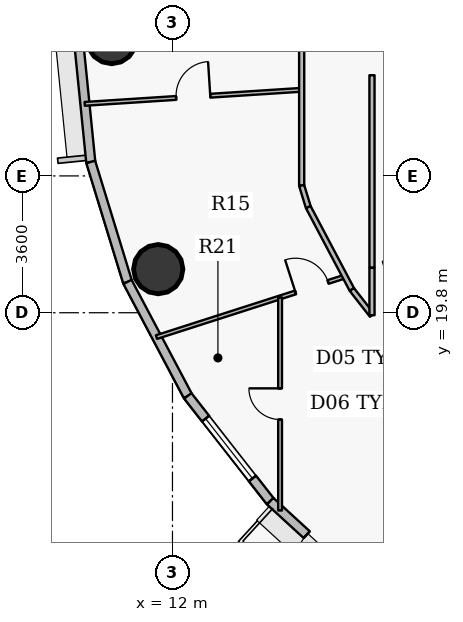
"""IFC4 building model, lengths in metres.
Left out: names, types, materials, properties, quantities, classifications, styles, units other than length and angle.
Written with IfcOpenShell. Run it as: python <this file> out.ifc"""

import sys

from ifc_helpers import new_model, si_unit, direction, frame, frame_2d, origin, origin_2d, place, context, subcontext, project, spatial, rectangle, hollow_circle, extrude, source, transform, mapped, element, fill, save


model = new_model("IFC4")
c1 = context("Model", 3, precision=1e-05, world=origin(), true_north=direction((0.0, 1.0)))
c2 = subcontext(c1, "Body", "Model", "MODEL_VIEW")
j1 = project(units=[si_unit("LENGTHUNIT", "METRE"), si_unit("PLANEANGLEUNIT", "RADIAN")], contexts=[c1])
p1 = place(None, origin())
s1 = spatial("IfcSite", under=j1, at=p1, CompositionType="ELEMENT")
p2 = place(p1, origin())
s2 = spatial("IfcBuilding", under=s1, at=p2, CompositionType="ELEMENT")
p3 = place(p2, frame((0.0, 0.0, 167.4)))
s3 = spatial("IfcBuildingStorey", under=s2, at=p3, CompositionType="ELEMENT", Elevation=167.4)
for number, where, z_axis, x_axis in (
    (1, (10.4, 27.0, 0.0), (0.0, 0.0, 1.0), (1.0, 0.0, 0.0)),
    (2, (11.625, 20.947, 0.0), (0.0, 0.0, 1.0), (1.0, 0.0, 0.0)),
):
    element("IfcColumn", number, at=place(p3, frame(where, z_axis=z_axis, x_axis=x_axis)), inside=s3, PredefinedType="COLUMN", context=c2, shape_type="SweptSolid", body=[
        extrude(hollow_circle(Radius=0.65, WallThickness=0.04, at=origin_2d()), origin(), (0.0, 0.0, 1.0), 3.75),
    ])
p4 = place(p3, frame((9.85, 23.766, 0.0), z_axis=(0.0, 0.0, 1.0), x_axis=(-0.100061534614, 0.994981250723, 0.0)))
e3 = element("IfcWall", 3, at=p4, inside=s3, PredefinedType="SOLIDWALL", context=c2, shape_type="SweptSolid", body=[
    extrude(rectangle(XDim=3.25, YDim=0.24, at=frame_2d((1.625, 0.0))), origin(), (0.0, 0.0, 1.0), 3.5),
])
p5 = place(p3, frame((10.817, 20.611, 0.0), z_axis=(0.0, 0.0, 1.0), x_axis=(-0.293097995113, 0.956082405058, 0.0)))
e4 = element("IfcWall", 4, at=p5, inside=s3, PredefinedType="SOLIDWALL", context=c2, shape_type="SweptSolid", body=[
    extrude(rectangle(XDim=3.3, YDim=0.24, at=frame_2d((1.65, 0.0))), origin(), (0.0, 0.0, 1.0), 3.5),
])
p6 = place(p3, frame((12.404, 17.612, 0.0), z_axis=(0.0, 0.0, 1.0), x_axis=(-0.467586874938, 0.88394712194, 0.0)))
e5 = element("IfcWall", 5, at=p6, inside=s3, PredefinedType="SOLIDWALL", context=c2, shape_type="SweptSolid", body=[
    extrude(rectangle(XDim=3.393, YDim=0.24, at=frame_2d((1.697, 0.0))), origin(), (0.0, 0.0, 1.0), 3.5),
])
p7 = place(p3, frame((14.572, 14.842, 0.0), z_axis=(0.0, 0.0, 1.0), x_axis=(-0.616287674549, 0.787521112224, 0.0)))
e6 = element("IfcWall", 6, at=p7, inside=s3, PredefinedType="SOLIDWALL", context=c2, shape_type="SweptSolid", body=[
    extrude(rectangle(XDim=3.517, YDim=0.24, at=frame_2d((1.759, 0.0))), origin(), (0.0, 0.0, 1.0), 3.5),
])
p8 = place(p7, frame((0.759, 0.0, 0.9)))
e7 = element("IfcOpeningElement", 7, at=p8, cuts=e6, PredefinedType="OPENING", context=c2, shape_type="SweptSolid", body=[
    extrude(rectangle(XDim=2.0, YDim=1.75, at=origin_2d()), frame((1.0, 0.13, 0.875), z_axis=(0.0, -1.0, 0.0), x_axis=(1.0, 0.0, 0.0)), (0.0, 0.0, 1.0), 0.26),
])
p9 = place(p3, frame((17.268, 12.369, 0.0), z_axis=(0.0, 0.0, 1.0), x_axis=(-0.737076565834, 0.675809245349, 0.0)))
e8 = element("IfcWall", 8, at=p9, inside=s3, PredefinedType="SOLIDWALL", context=c2, shape_type="SweptSolid", body=[
    extrude(rectangle(XDim=3.658, YDim=0.24, at=frame_2d((1.829, 0.0))), origin(), (0.0, 0.0, 1.0), 3.5),
])
p10 = place(p9, frame((1.304, 0.0, 0.0)))
e9 = element("IfcOpeningElement", 9, at=p10, cuts=e8, PredefinedType="OPENING", context=c2, shape_type="SweptSolid", body=[
    extrude(rectangle(XDim=1.05, YDim=2.15, at=origin_2d()), frame((0.525, 0.13, 1.075), z_axis=(0.0, -1.0, 0.0), x_axis=(1.0, 0.0, 0.0)), (0.0, 0.0, 1.0), 0.26),
])
p11 = place(p3, frame((9.691, 25.296, 0.0), z_axis=(0.0, 0.0, 1.0), x_axis=(0.99791042292, 0.064612598054, 0.0)))
e10 = element("IfcWall", 10, at=p11, inside=s3, PredefinedType="PARTITIONING", context=c2, shape_type="SweptSolid", body=[
    extrude(rectangle(XDim=5.721, YDim=0.1, at=frame_2d((2.86, 0.0))), origin(), (0.0, 0.0, 1.0), 2.935),
])
p12 = place(p11, frame((2.41, 0.0, 0.0)))
e11 = element("IfcOpeningElement", 11, at=p12, cuts=e10, PredefinedType="OPENING", context=c2, shape_type="SweptSolid", body=[
    extrude(rectangle(XDim=0.9, YDim=2.1, at=origin_2d()), frame((0.45, 0.06, 1.05), z_axis=(0.0, -1.0, 0.0), x_axis=(1.0, 0.0, 0.0)), (0.0, 0.0, 1.0), 0.12),
])
p13 = place(p3, frame((11.58, 19.159, 0.0), z_axis=(0.0, 0.0, 1.0), x_axis=(0.952134795804, 0.305678475885, 0.0)))
e12 = element("IfcWall", 12, at=p13, inside=s3, PredefinedType="PARTITIONING", context=c2, shape_type="SweptSolid", body=[
    extrude(rectangle(XDim=5.21, YDim=0.1, at=frame_2d((2.605, 0.0))), origin(), (0.0, 0.0, 1.0), 2.935),
])
p14 = place(p13, frame((3.843, 0.0, 0.0)))
e13 = element("IfcOpeningElement", 13, at=p14, cuts=e12, PredefinedType="OPENING", context=c2, shape_type="SweptSolid", body=[
    extrude(rectangle(XDim=0.9, YDim=2.1, at=origin_2d()), frame((0.45, 0.06, 1.05), z_axis=(0.0, -1.0, 0.0), x_axis=(1.0, 0.0, 0.0)), (0.0, 0.0, 1.0), 0.12),
])
p15 = place(p3, frame((14.832, 14.596, 0.0), z_axis=(0.0, 0.0, 1.0), x_axis=(0.0, 1.0, 0.0)))
e14 = element("IfcWall", 14, at=p15, inside=s3, PredefinedType="PARTITIONING", context=c2, shape_type="SweptSolid", body=[
    extrude(rectangle(XDim=5.607, YDim=0.1, at=frame_2d((2.804, 0.0))), origin(), (0.0, 0.0, 1.0), 2.935),
])
p16 = place(p15, frame((2.394, 0.0, 0.0)))
e15 = element("IfcOpeningElement", 15, at=p16, cuts=e14, PredefinedType="OPENING", context=c2, shape_type="SweptSolid", body=[
    extrude(rectangle(XDim=0.82, YDim=2.1, at=origin_2d()), frame((0.41, 0.06, 1.05), z_axis=(0.0, -1.0, 0.0), x_axis=(1.0, 0.0, 0.0)), (0.0, 0.0, 1.0), 0.12),
])
p17 = place(p3, frame((15.4, 23.146, 0.0), z_axis=(0.0, 0.0, 1.0), x_axis=(0.0, 1.0, 0.0)))
e16 = element("IfcWall", 16, at=p17, inside=s3, PredefinedType="PARTITIONING", context=c2, shape_type="SweptSolid", body=[
    extrude(rectangle(XDim=4.804, YDim=0.135, at=frame_2d((2.402, 0.0))), origin(), (0.0, 0.0, 1.0), 2.935),
])
p18 = place(p3, frame((15.4, 23.146, 0.0), z_axis=(0.0, 0.0, 1.0), x_axis=(0.293335154151, -0.956009669061, 0.0)))
e17 = element("IfcWall", 17, at=p18, inside=s3, PredefinedType="PARTITIONING", context=c2, shape_type="SweptSolid", body=[
    extrude(rectangle(XDim=0.594, YDim=0.135, at=frame_2d((0.297, 0.0))), origin(), (0.0, 0.0, 1.0), 3.5),
])
p19 = place(p3, frame((15.574, 22.578, 0.0), z_axis=(0.0, 0.0, 1.0), x_axis=(0.467608615334, -0.883935621448, 0.0)))
e18 = element("IfcWall", 18, at=p19, inside=s3, PredefinedType="PARTITIONING", context=c2, shape_type="SweptSolid", body=[
    extrude(rectangle(XDim=2.452, YDim=0.135, at=frame_2d((1.226, 0.0))), origin(), (0.0, 0.0, 1.0), 2.935),
])
p20 = place(p3, frame((16.72, 20.411, 0.0), z_axis=(0.0, 0.0, 1.0), x_axis=(0.616377221056, -0.787451027914, 0.0)))
e19 = element("IfcWall", 19, at=p20, inside=s3, PredefinedType="PARTITIONING", context=c2, shape_type="SweptSolid", body=[
    extrude(rectangle(XDim=0.859, YDim=0.135, at=frame_2d((0.43, 0.0))), origin(), (0.0, 0.0, 1.0), 3.5),
])
p21 = place(p3, frame((17.25, 19.734, 0.0), z_axis=(0.0, 0.0, 1.0), x_axis=(0.0, 1.0, 0.0)))
e20 = element("IfcWall", 20, at=p21, inside=s3, PredefinedType="PARTITIONING", context=c2, shape_type="SweptSolid", body=[
    extrude(rectangle(XDim=1.246, YDim=0.135, at=frame_2d((0.623, 0.0))), origin(), (0.0, 0.0, 1.0), 3.5),
])
p22 = place(p3, frame((17.25, 26.05, 0.0), z_axis=(0.0, 0.0, 1.0), x_axis=(0.0, -1.0, 0.0)))
e21 = element("IfcWall", 21, at=p22, inside=s3, PredefinedType="PARTITIONING", context=c2, shape_type="SweptSolid", body=[
    extrude(rectangle(XDim=5.06, YDim=0.135, at=frame_2d((2.53, 0.0))), origin(), (0.0, 0.0, 1.0), 2.935),
])
p23 = place(p3, frame((17.558, 21.079, 0.0), z_axis=(0.0, 0.0, 1.0), x_axis=(0.952123939642, 0.305712288861, 0.0)))
e22 = element("IfcWall", 22, at=p23, inside=s3, PredefinedType="PARTITIONING", context=c2, shape_type="SweptSolid", body=[
    extrude(rectangle(XDim=1.438, YDim=0.135, at=frame_2d((0.719, 0.0))), origin(), (0.0, 0.0, 1.0), 3.5),
])
m1 = source(origin(), c2, "Body", "SweptSolid", [
    extrude(rectangle(XDim=2.0, YDim=1.75, at=origin_2d()), frame((1.0, 0.03, 0.875), z_axis=(0.0, -1.0, 0.0), x_axis=(1.0, 0.0, 0.0)), (0.0, 0.0, 1.0), 0.06),
])
p24 = place(p8, origin())
e23 = element("IfcWindow", 23, at=p24, inside=s3, PartitioningType="DOUBLE_PANEL_VERTICAL", PredefinedType="WINDOW", context=c2, shape_type="MappedRepresentation", body=[
    mapped(m1, transform((0.0, 0.0, 0.0), x_axis=(1.0, 0.0, 0.0), y_axis=(0.0, 1.0, 0.0), z_axis=(0.0, 0.0, 1.0), scale=1.0)),
])
fill(e7, e23)
m2 = source(origin(), c2, "Body", "SweptSolid", [
    extrude(rectangle(XDim=1.05, YDim=2.15, at=origin_2d()), frame((0.525, 0.025, 1.075), z_axis=(0.0, -1.0, 0.0), x_axis=(1.0, 0.0, 0.0)), (0.0, 0.0, 1.0), 0.05),
])
p25 = place(p10, origin())
e24 = element("IfcDoor", 24, at=p25, inside=s3, OperationType="SINGLE_SWING_LEFT", PredefinedType="DOOR", context=c2, shape_type="MappedRepresentation", body=[
    mapped(m2, transform((0.0, 0.0, 0.0), x_axis=(1.0, 0.0, 0.0), y_axis=(0.0, 1.0, 0.0), z_axis=(0.0, 0.0, 1.0), scale=1.0)),
])
fill(e9, e24)
m3 = source(origin(), c2, "Body", "SweptSolid", [
    extrude(rectangle(XDim=0.9, YDim=2.1, at=origin_2d()), frame((0.45, 0.025, 1.05), z_axis=(0.0, -1.0, 0.0), x_axis=(1.0, 0.0, 0.0)), (0.0, 0.0, 1.0), 0.05),
])
p26 = place(p14, origin())
e25 = element("IfcDoor", 25, at=p26, inside=s3, OperationType="SINGLE_SWING_LEFT", PredefinedType="DOOR", context=c2, shape_type="MappedRepresentation", body=[
    mapped(m3, transform((0.0, 0.0, 0.0), x_axis=(1.0, 0.0, 0.0), y_axis=(0.0, 1.0, 0.0), z_axis=(0.0, 0.0, 1.0), scale=1.0)),
])
fill(e13, e25)
m4 = source(origin(), c2, "Body", "SweptSolid", [
    extrude(rectangle(XDim=0.82, YDim=2.1, at=origin_2d()), frame((0.41, 0.025, 1.05), z_axis=(0.0, -1.0, 0.0), x_axis=(1.0, 0.0, 0.0)), (0.0, 0.0, 1.0), 0.05),
])
p27 = place(p16, origin())
e26 = element("IfcDoor", 26, at=p27, inside=s3, OperationType="SINGLE_SWING_RIGHT", PredefinedType="DOOR", context=c2, shape_type="MappedRepresentation", body=[
    mapped(m4, transform((0.0, 0.0, 0.0), x_axis=(1.0, 0.0, 0.0), y_axis=(0.0, 1.0, 0.0), z_axis=(0.0, 0.0, 1.0), scale=1.0)),
])
fill(e15, e26)
p28 = place(p12, origin())
e27 = element("IfcDoor", 27, at=p28, inside=s3, OperationType="SINGLE_SWING_RIGHT", PredefinedType="DOOR", context=c2, shape_type="MappedRepresentation", body=[
    mapped(m3, transform((0.0, 0.0, 0.0), x_axis=(1.0, 0.0, 0.0), y_axis=(0.0, 1.0, 0.0), z_axis=(0.0, 0.0, 1.0), scale=1.0)),
])
fill(e11, e27)
save(model, sys.argv[1])
